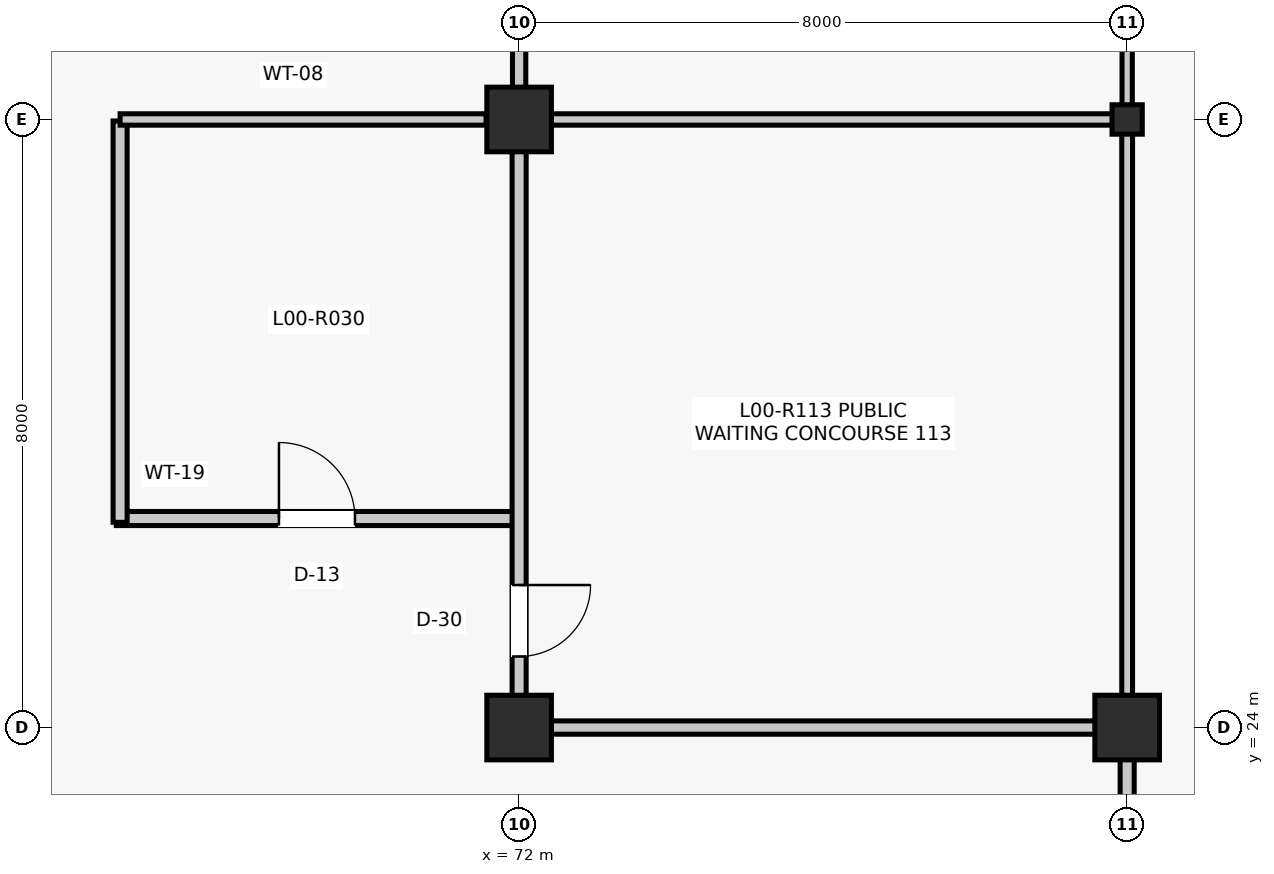
"""IFC4 building model, lengths in metres.
Left out: names, types, materials, properties, quantities, classifications, styles, units other than length and angle.
Written with IfcOpenShell. Run it as: python <this file> out.ifc"""

import sys

from ifc_helpers import new_model, si_unit, direction, frame, frame_2d, origin, origin_2d, place, context, subcontext, project, spatial, rectangle, i_section, extrude, element, fill, save


model = new_model("IFC4")
c1 = context("Model", 3, precision=1e-05, world=origin(), true_north=direction((0.0, 1.0)))
c2 = subcontext(c1, "Body", "Model", "MODEL_VIEW")
j1 = project(units=[si_unit("LENGTHUNIT", "METRE"), si_unit("PLANEANGLEUNIT", "RADIAN")], contexts=[c1])
p1 = place(None, origin())
s1 = spatial("IfcSite", under=j1, at=p1, CompositionType="ELEMENT")
p2 = place(p1, origin())
s2 = spatial("IfcBuilding", under=s1, at=p2, CompositionType="ELEMENT")
p3 = place(p2, origin())
s3 = spatial("IfcBuildingStorey", under=s2, at=p3, CompositionType="ELEMENT", Elevation=0.0)
for number, where, z_axis, x_axis in (
    (1, (72.0, 24.0, 0.0), (0.0, 0.0, 1.0), (1.0, 0.0, 0.0)),
    (2, (72.0, 32.0, 0.0), (0.0, 0.0, 1.0), (1.0, 0.0, 0.0)),
    (3, (80.0, 24.0, 0.0), (0.0, 0.0, 1.0), (1.0, 0.0, 0.0)),
):
    element("IfcColumn", number, at=place(p3, frame(where, z_axis=z_axis, x_axis=x_axis)), inside=s3, PredefinedType="COLUMN", context=c2, shape_type="SweptSolid", body=[
        extrude(rectangle(XDim=0.85, YDim=0.85, at=origin_2d()), origin(), (0.0, 0.0, 1.0), 5.28),
    ])
p4 = place(p3, frame((80.0, 32.0, 0.0), z_axis=(0.0, 0.0, 1.0), x_axis=(1.0, 0.0, 0.0)))
e4 = element("IfcColumn", 4, at=p4, inside=s3, PredefinedType="COLUMN", context=c2, shape_type="SweptSolid", body=[
    extrude(i_section(OverallWidth=0.398, OverallDepth=0.387, WebThickness=0.021, FlangeThickness=0.033, FilletRadius=0.015, at=origin_2d()), origin(), (0.0, 0.0, 1.0), 5.28),
])
p5 = place(p3, frame((66.7, 26.75, 0.0), z_axis=(0.0, 0.0, 1.0), x_axis=(1.0, 0.0, 0.0)))
e5 = element("IfcWall", 5, at=p5, inside=s3, PredefinedType="PARTITIONING", context=c2, shape_type="SweptSolid", body=[
    extrude(rectangle(XDim=5.28, YDim=0.185, at=frame_2d((2.64, 0.0))), origin(), (0.0, 0.0, 1.0), 4.403),
])
p6 = place(p5, frame((2.14, 0.0, 0.0)))
e6 = element("IfcOpeningElement", 6, at=p6, cuts=e5, PredefinedType="OPENING", context=c2, shape_type="SweptSolid", body=[
    extrude(rectangle(XDim=1.0, YDim=2.15, at=frame_2d((0.5, 1.075))), frame((0.0, 0.103, 0.0), z_axis=(0.0, -1.0, 0.0), x_axis=(1.0, 0.0, 0.0)), (0.0, 0.0, 1.0), 0.205),
])
p7 = place(p3, frame((66.75, 26.7, 0.0), z_axis=(0.0, 0.0, 1.0), x_axis=(0.0, 1.0, 0.0)))
e7 = element("IfcWall", 7, at=p7, inside=s3, PredefinedType="PARTITIONING", context=c2, shape_type="SweptSolid", body=[
    extrude(rectangle(XDim=5.28, YDim=0.185, at=frame_2d((2.64, 0.0))), origin(), (0.0, 0.0, 1.0), 4.327),
])
p8 = place(p3, frame((66.75, 32.0, 0.0), z_axis=(0.0, 0.0, 1.0), x_axis=(1.0, 0.0, 0.0)))
e8 = element("IfcWall", 8, at=p8, inside=s3, PredefinedType="PARTITIONING", context=c2, shape_type="SweptSolid", body=[
    extrude(rectangle(XDim=4.815, YDim=0.15, at=frame_2d((2.407, 0.0))), origin(), (0.0, 0.0, 1.0), 4.327),
])
p9 = place(p3, frame((72.0, 24.415, 0.0), z_axis=(0.0, 0.0, 1.0), x_axis=(0.0, 1.0, 0.0)))
e9 = element("IfcWall", 9, at=p9, inside=s3, PredefinedType="PARTITIONING", context=c2, shape_type="SweptSolid", body=[
    extrude(rectangle(XDim=7.17, YDim=0.185, at=frame_2d((3.585, 0.0))), origin(), (0.0, 0.0, 1.0), 4.403),
])
p10 = place(p9, frame((0.52, 0.0, 0.0)))
e10 = element("IfcOpeningElement", 10, at=p10, cuts=e9, PredefinedType="OPENING", context=c2, shape_type="SweptSolid", body=[
    extrude(rectangle(XDim=0.94, YDim=2.12, at=frame_2d((0.47, 1.06))), frame((0.0, 0.103, 0.0), z_axis=(0.0, -1.0, 0.0), x_axis=(1.0, 0.0, 0.0)), (0.0, 0.0, 1.0), 0.205),
])
p11 = place(p3, frame((72.0, 32.415, 0.0), z_axis=(0.0, 0.0, 1.0), x_axis=(0.0, 1.0, 0.0)))
e11 = element("IfcWall", 11, at=p11, inside=s3, PredefinedType="PARTITIONING", context=c2, shape_type="SweptSolid", body=[
    extrude(rectangle(XDim=7.17, YDim=0.175, at=frame_2d((3.585, 0.0))), origin(), (0.0, 0.0, 1.0), 4.412),
])
p12 = place(p11, frame((0.52, 0.0, 0.0)))
e12 = element("IfcOpeningElement", 12, at=p12, cuts=e11, PredefinedType="OPENING", context=c2, shape_type="SweptSolid", body=[
    extrude(rectangle(XDim=0.94, YDim=2.12, at=frame_2d((0.47, 1.06))), frame((0.0, 0.097, 0.0), z_axis=(0.0, -1.0, 0.0), x_axis=(1.0, 0.0, 0.0)), (0.0, 0.0, 1.0), 0.195),
])
p13 = place(p3, frame((80.0, 16.415, 0.0), z_axis=(0.0, 0.0, 1.0), x_axis=(0.0, 1.0, 0.0)))
e13 = element("IfcWall", 13, at=p13, inside=s3, PredefinedType="PARTITIONING", context=c2, shape_type="SweptSolid", body=[
    extrude(rectangle(XDim=7.17, YDim=0.185, at=frame_2d((3.585, 0.0))), origin(), (0.0, 0.0, 1.0), 4.603),
])
p14 = place(p13, frame((2.935, 0.0, 0.0)))
e14 = element("IfcOpeningElement", 14, at=p14, cuts=e13, PredefinedType="OPENING", context=c2, shape_type="SweptSolid", body=[
    extrude(rectangle(XDim=1.3, YDim=2.2, at=frame_2d((0.65, 1.1))), frame((0.0, 0.103, 0.0), z_axis=(0.0, -1.0, 0.0), x_axis=(1.0, 0.0, 0.0)), (0.0, 0.0, 1.0), 0.205),
])
p15 = place(p3, frame((72.415, 24.0, 0.0), z_axis=(0.0, 0.0, 1.0), x_axis=(1.0, 0.0, 0.0)))
e15 = element("IfcWall", 15, at=p15, inside=s3, PredefinedType="PARTITIONING", context=c2, shape_type="SweptSolid", body=[
    extrude(rectangle(XDim=7.17, YDim=0.175, at=frame_2d((3.585, 0.0))), origin(), (0.0, 0.0, 1.0), 4.327),
])
p16 = place(p3, frame((80.0, 24.415, 0.0), z_axis=(0.0, 0.0, 1.0), x_axis=(0.0, 1.0, 0.0)))
e16 = element("IfcWall", 16, at=p16, inside=s3, PredefinedType="PARTITIONING", context=c2, shape_type="SweptSolid", body=[
    extrude(rectangle(XDim=7.401, YDim=0.142, at=frame_2d((3.701, 0.0))), origin(), (0.0, 0.0, 1.0), 4.667),
])
p17 = place(p3, frame((72.415, 32.0, 0.0), z_axis=(0.0, 0.0, 1.0), x_axis=(1.0, 0.0, 0.0)))
e17 = element("IfcWall", 17, at=p17, inside=s3, PredefinedType="PARTITIONING", context=c2, shape_type="SweptSolid", body=[
    extrude(rectangle(XDim=7.396, YDim=0.15, at=frame_2d((3.698, 0.0))), origin(), (0.0, 0.0, 1.0), 4.403),
])
p18 = place(p3, frame((80.0, 32.184, 0.0), z_axis=(0.0, 0.0, 1.0), x_axis=(0.0, 1.0, 0.0)))
e18 = element("IfcWall", 18, at=p18, inside=s3, PredefinedType="PARTITIONING", context=c2, shape_type="SweptSolid", body=[
    extrude(rectangle(XDim=7.633, YDim=0.135, at=frame_2d((3.816, 0.0))), origin(), (0.0, 0.0, 1.0), 4.607),
])
p19 = place(p6, origin())
e19 = element("IfcDoor", 19, at=p19, inside=s3, OperationType="SINGLE_SWING_LEFT", PredefinedType="DOOR", context=c2, shape_type="SweptSolid", body=[
    extrude(rectangle(XDim=1.0, YDim=2.15, at=frame_2d((0.5, 1.075))), frame((0.0, 0.025, 0.0), z_axis=(0.0, -1.0, 0.0), x_axis=(1.0, 0.0, 0.0)), (0.0, 0.0, 1.0), 0.05),
])
fill(e6, e19)
p20 = place(p10, frame((0.94, 0.0, 0.0), z_axis=(0.0, 0.0, 1.0), x_axis=(-1.0, 0.0, 0.0)))
e20 = element("IfcDoor", 20, at=p20, inside=s3, OperationType="SINGLE_SWING_RIGHT", PredefinedType="DOOR", context=c2, shape_type="SweptSolid", body=[
    extrude(rectangle(XDim=0.94, YDim=2.12, at=frame_2d((0.47, 1.06))), frame((0.0, 0.025, 0.0), z_axis=(0.0, -1.0, 0.0), x_axis=(1.0, 0.0, 0.0)), (0.0, 0.0, 1.0), 0.05),
])
fill(e10, e20)
save(model, sys.argv[1])
